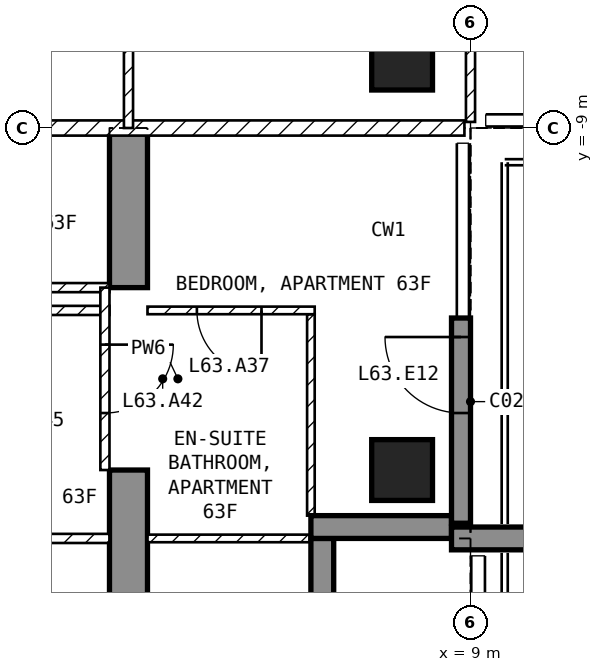
"""IFC4 building model, lengths in metres.
Left out: names, types, materials, properties, quantities, classifications, styles, units other than length and angle.
Written with IfcOpenShell. Run it as: python <this file> out.ifc"""

import sys

from ifc_helpers import new_model, si_unit, direction, frame, frame_2d, origin, origin_2d, place, context, subcontext, project, spatial, polyline, rectangle, outline, extrude, element, fill, save


model = new_model("IFC4")
c1 = context("Model", 3, precision=1e-05, world=origin(), true_north=direction((0.0, 1.0)))
c2 = subcontext(c1, "Body", "Model", "MODEL_VIEW")
j1 = project(units=[si_unit("LENGTHUNIT", "METRE"), si_unit("PLANEANGLEUNIT", "RADIAN")], contexts=[c1])
p1 = place(None, origin())
s1 = spatial("IfcSite", under=j1, at=p1, CompositionType="ELEMENT")
p2 = place(p1, origin())
s2 = spatial("IfcBuilding", under=s1, at=p2, CompositionType="ELEMENT")
p3 = place(p2, frame((0.0, 0.0, 250.0)))
s3 = spatial("IfcBuildingStorey", under=s2, at=p3, CompositionType="ELEMENT", Elevation=250.0)
for number, where, z_axis, x_axis in (
    (1, (8.1, -13.5, -0.25), (0.0, 0.0, 1.0), (1.0, 0.0, 0.0)),
    (2, (8.1, -8.1, -0.25), (0.0, 0.0, 1.0), (1.0, 0.0, 0.0)),
):
    element("IfcColumn", number, at=place(p3, frame(where, z_axis=z_axis, x_axis=x_axis)), inside=s3, PredefinedType="COLUMN", context=c2, shape_type="SweptSolid", body=[
        extrude(rectangle(XDim=0.8, YDim=0.8, at=origin_2d()), origin(), (0.0, 0.0, 1.0), 3.5),
    ])
p4 = place(p3, frame((4.25, -16.7, -0.25), z_axis=(1.0, 0.0, 0.0), x_axis=(0.0, 1.0, 0.0)))
e3 = element("IfcWall", 3, at=p4, inside=s3, PredefinedType="SHEAR", context=c2, shape_type="SweptSolid", body=[
    extrude(outline(polyline([(0.0, 0.0), (3.2, 0.0), (3.2, 2.65), (5.6, 2.65), (5.6, 0.0), (7.7, 0.0), (7.7, 3.5), (0.0, 3.5), (0.0, 0.0)])), origin(), (0.0, 0.0, 1.0), 0.5),
])
p5 = place(p3, frame((8.875, -14.2, 0.0), z_axis=(0.0, 0.0, 1.0), x_axis=(0.0, 1.0, 0.0)))
e4 = element("IfcWall", 4, at=p5, inside=s3, PredefinedType="SOLIDWALL", context=c2, shape_type="SweptSolid", body=[
    extrude(rectangle(XDim=2.7, YDim=0.25, at=frame_2d((1.35, 0.0))), origin(), (0.0, 0.0, 1.0), 3.25),
])
p6 = place(p5, frame((1.45, 0.0, 0.0)))
e5 = element("IfcOpeningElement", 5, at=p6, cuts=e4, PredefinedType="OPENING", context=c2, shape_type="SweptSolid", body=[
    extrude(rectangle(XDim=1.0, YDim=2.4, at=frame_2d((0.5, 1.2))), frame((0.0, 0.135, 0.0), z_axis=(0.0, -1.0, 0.0), x_axis=(1.0, 0.0, 0.0)), (0.0, 0.0, 1.0), 0.27),
])
p7 = place(p3, frame((7.05, -16.2, 0.0), z_axis=(0.0, 0.0, 1.0), x_axis=(0.0, 1.0, 0.0)))
e6 = element("IfcWall", 6, at=p7, inside=s3, PredefinedType="SOLIDWALL", context=c2, shape_type="SweptSolid", body=[
    extrude(rectangle(XDim=1.8, YDim=0.3, at=frame_2d((0.9, 0.0))), origin(), (0.0, 0.0, 1.0), 3.25),
])
p8 = place(p3, frame((6.9, -14.25, 0.0), z_axis=(0.0, 0.0, 1.0), x_axis=(1.0, 0.0, 0.0)))
e7 = element("IfcWall", 7, at=p8, inside=s3, PredefinedType="SOLIDWALL", context=c2, shape_type="SweptSolid", body=[
    extrude(rectangle(XDim=1.85, YDim=0.3, at=frame_2d((0.925, 0.0))), origin(), (0.0, 0.0, 1.0), 3.25),
])
p9 = place(p3, frame((8.75, -14.4, 0.0), z_axis=(0.0, 0.0, 1.0), x_axis=(1.0, 0.0, 0.0)))
e8 = element("IfcWall", 8, at=p9, inside=s3, PredefinedType="SOLIDWALL", context=c2, shape_type="SweptSolid", body=[
    extrude(rectangle(XDim=2.95, YDim=0.3, at=frame_2d((1.475, 0.0))), origin(), (0.0, 0.0, 1.0), 3.25),
])
p10 = place(p3, frame((8.92, -9.0, 0.0), z_axis=(0.0, 0.0, 1.0), x_axis=(-1.0, 0.0, 0.0)))
e9 = element("IfcWall", 9, at=p10, inside=s3, PredefinedType="PARTITIONING", context=c2, shape_type="SweptSolid", body=[
    extrude(rectangle(XDim=17.84, YDim=0.2, at=frame_2d((8.92, 0.0))), origin(), (0.0, 0.0, 1.0), 3.25),
])
p11 = place(p10, frame((8.42, 0.0, 0.0)))
e10 = element("IfcOpeningElement", 10, at=p11, cuts=e9, PredefinedType="OPENING", context=c2, shape_type="SweptSolid", body=[
    extrude(rectangle(XDim=1.0, YDim=2.1, at=frame_2d((0.5, 1.05))), frame((0.0, 0.11, 0.0), z_axis=(0.0, -1.0, 0.0), x_axis=(1.0, 0.0, 0.0)), (0.0, 0.0, 1.0), 0.22),
])
p12 = place(p3, frame((9.0, -8.92, 0.0), z_axis=(0.0, 0.0, 1.0), x_axis=(0.0, 1.0, 0.0)))
e11 = element("IfcWall", 11, at=p12, inside=s3, PredefinedType="PARTITIONING", context=c2, shape_type="SweptSolid", body=[
    extrude(rectangle(XDim=7.62, YDim=0.12, at=frame_2d((3.81, 0.0))), origin(), (0.0, 0.0, 1.0), 3.25),
])
p13 = place(p12, frame((2.32, 0.0, 0.0)))
e12 = element("IfcOpeningElement", 12, at=p13, cuts=e11, PredefinedType="OPENING", context=c2, shape_type="SweptSolid", body=[
    extrude(rectangle(XDim=0.9, YDim=2.1, at=frame_2d((0.45, 1.05))), frame((0.0, 0.07, 0.0), z_axis=(0.0, -1.0, 0.0), x_axis=(1.0, 0.0, 0.0)), (0.0, 0.0, 1.0), 0.14),
])
p14 = place(p3, frame((4.5, -9.0, 0.0), z_axis=(0.0, 0.0, 1.0), x_axis=(0.0, 1.0, 0.0)))
e13 = element("IfcWall", 13, at=p14, inside=s3, PredefinedType="PARTITIONING", context=c2, shape_type="SweptSolid", body=[
    extrude(rectangle(XDim=4.5, YDim=0.12, at=frame_2d((2.25, 0.0))), origin(), (0.0, 0.0, 1.0), 3.25),
])
p15 = place(p14, frame((1.8, 0.0, 0.0)))
e14 = element("IfcOpeningElement", 14, at=p15, cuts=e13, PredefinedType="OPENING", context=c2, shape_type="SweptSolid", body=[
    extrude(rectangle(XDim=0.9, YDim=2.1, at=frame_2d((0.45, 1.05))), frame((0.0, 0.07, 0.0), z_axis=(0.0, -1.0, 0.0), x_axis=(1.0, 0.0, 0.0)), (0.0, 0.0, 1.0), 0.14),
])
p16 = place(p3, frame((4.25, -11.1, 0.0), z_axis=(0.0, 0.0, 1.0), x_axis=(-1.0, 0.0, 0.0)))
e15 = element("IfcWall", 15, at=p16, inside=s3, PredefinedType="PARTITIONING", context=c2, shape_type="SweptSolid", body=[
    extrude(rectangle(XDim=6.35, YDim=0.12, at=frame_2d((3.175, 0.0))), origin(), (0.0, 0.0, 1.0), 3.25),
])
p17 = place(p16, frame((3.825, 0.0, 0.0)))
e16 = element("IfcOpeningElement", 16, at=p17, cuts=e15, PredefinedType="OPENING", context=c2, shape_type="SweptSolid", body=[
    extrude(rectangle(XDim=0.9, YDim=2.1, at=frame_2d((0.45, 1.05))), frame((0.0, 0.07, 0.0), z_axis=(0.0, -1.0, 0.0), x_axis=(1.0, 0.0, 0.0)), (0.0, 0.0, 1.0), 0.14),
])
p18 = place(p3, frame((4.25, -11.4, 0.0), z_axis=(0.0, 0.0, 1.0), x_axis=(-1.0, 0.0, 0.0)))
e17 = element("IfcWall", 17, at=p18, inside=s3, PredefinedType="PARTITIONING", context=c2, shape_type="SweptSolid", body=[
    extrude(rectangle(XDim=3.81, YDim=0.12, at=frame_2d((1.905, 0.0))), origin(), (0.0, 0.0, 1.0), 3.25),
])
p19 = place(p3, frame((4.25, -14.4, 0.0), z_axis=(0.0, 0.0, 1.0), x_axis=(-1.0, 0.0, 0.0)))
e18 = element("IfcWall", 18, at=p19, inside=s3, PredefinedType="PARTITIONING", context=c2, shape_type="SweptSolid", body=[
    extrude(rectangle(XDim=8.5, YDim=0.12, at=frame_2d((4.25, 0.0))), origin(), (0.0, 0.0, 1.0), 3.25),
])
p20 = place(p19, frame((5.675, 0.0, 0.0)))
e19 = element("IfcOpeningElement", 19, at=p20, cuts=e18, PredefinedType="OPENING", context=c2, shape_type="SweptSolid", body=[
    extrude(rectangle(XDim=0.9, YDim=2.1, at=frame_2d((0.45, 1.05))), frame((0.0, 0.07, 0.0), z_axis=(0.0, -1.0, 0.0), x_axis=(1.0, 0.0, 0.0)), (0.0, 0.0, 1.0), 0.14),
])
p21 = place(p3, frame((6.9, -14.1, 0.0), z_axis=(0.0, 0.0, 1.0), x_axis=(0.0, 1.0, 0.0)))
e20 = element("IfcWall", 20, at=p21, inside=s3, PredefinedType="PARTITIONING", context=c2, shape_type="SweptSolid", body=[
    extrude(rectangle(XDim=2.65, YDim=0.1, at=frame_2d((1.325, 0.0))), origin(), (0.0, 0.0, 1.0), 3.25),
])
p22 = place(p3, frame((6.95, -11.4, 0.0), z_axis=(0.0, 0.0, 1.0), x_axis=(-1.0, 0.0, 0.0)))
e21 = element("IfcWall", 21, at=p22, inside=s3, PredefinedType="PARTITIONING", context=c2, shape_type="SweptSolid", body=[
    extrude(rectangle(XDim=2.2, YDim=0.1, at=frame_2d((1.1, 0.0))), origin(), (0.0, 0.0, 1.0), 3.25),
])
p23 = place(p22, frame((0.7, 0.0, 0.0)))
e22 = element("IfcOpeningElement", 22, at=p23, cuts=e21, PredefinedType="OPENING", context=c2, shape_type="SweptSolid", body=[
    extrude(rectangle(XDim=0.85, YDim=2.1, at=frame_2d((0.425, 1.05))), frame((0.0, 0.06, 0.0), z_axis=(0.0, -1.0, 0.0), x_axis=(1.0, 0.0, 0.0)), (0.0, 0.0, 1.0), 0.12),
])
p24 = place(p3, frame((7.12, -14.4, 0.0), z_axis=(0.0, 0.0, 1.0), x_axis=(-1.0, 0.0, 0.0)))
e23 = element("IfcWall", 23, at=p24, inside=s3, PredefinedType="PARTITIONING", context=c2, shape_type="SweptSolid", body=[
    extrude(rectangle(XDim=2.37, YDim=0.1, at=frame_2d((1.185, 0.0))), origin(), (0.0, 0.0, 1.0), 3.25),
])
p25 = place(p3, frame((4.19, -11.1, 0.0), z_axis=(0.0, 0.0, 1.0), x_axis=(0.0, -1.0, 0.0)))
e24 = element("IfcWall", 24, at=p25, inside=s3, PredefinedType="PARTITIONING", context=c2, shape_type="SweptSolid", body=[
    extrude(rectangle(XDim=2.4, YDim=0.12, at=frame_2d((1.2, 0.0))), origin(), (0.0, 0.0, 1.0), 2.4),
])
p26 = place(p25, frame((0.75, 0.0, 0.0)))
e25 = element("IfcOpeningElement", 25, at=p26, cuts=e24, PredefinedType="OPENING", context=c2, shape_type="SweptSolid", body=[
    extrude(rectangle(XDim=0.9, YDim=2.1, at=frame_2d((0.45, 1.05))), frame((0.0, 0.07, 0.0), z_axis=(0.0, -1.0, 0.0), x_axis=(1.0, 0.0, 0.0)), (0.0, 0.0, 1.0), 0.14),
])
p27 = place(p6, origin())
e26 = element("IfcDoor", 26, at=p27, inside=s3, OperationType="SINGLE_SWING_RIGHT", PredefinedType="DOOR", context=c2, shape_type="SweptSolid", body=[
    extrude(rectangle(XDim=1.0, YDim=2.4, at=frame_2d((0.5, 1.2))), frame((0.0, 0.025, 0.0), z_axis=(0.0, -1.0, 0.0), x_axis=(1.0, 0.0, 0.0)), (0.0, 0.0, 1.0), 0.05),
])
fill(e5, e26)
p28 = place(p23, origin())
e27 = element("IfcDoor", 27, at=p28, inside=s3, OperationType="SINGLE_SWING_LEFT", PredefinedType="DOOR", context=c2, shape_type="SweptSolid", body=[
    extrude(rectangle(XDim=0.85, YDim=2.1, at=frame_2d((0.425, 1.05))), frame((0.0, 0.025, 0.0), z_axis=(0.0, -1.0, 0.0), x_axis=(1.0, 0.0, 0.0)), (0.0, 0.0, 1.0), 0.05),
])
fill(e22, e27)
p29 = place(p26, origin())
e28 = element("IfcDoor", 28, at=p29, inside=s3, OperationType="SINGLE_SWING_LEFT", PredefinedType="DOOR", context=c2, shape_type="SweptSolid", body=[
    extrude(rectangle(XDim=0.9, YDim=2.1, at=frame_2d((0.45, 1.05))), frame((0.0, 0.025, 0.0), z_axis=(0.0, -1.0, 0.0), x_axis=(1.0, 0.0, 0.0)), (0.0, 0.0, 1.0), 0.05),
])
fill(e25, e28)
save(model, sys.argv[1])
